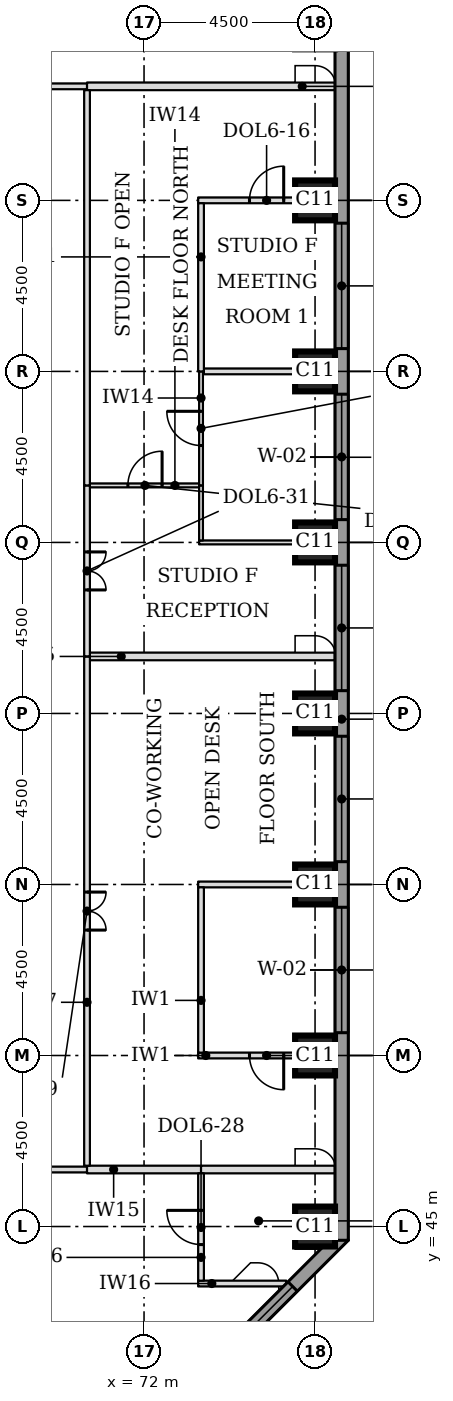
"""IFC4 building model, lengths in metres.
Left out: names, types, materials, properties, quantities, classifications, styles, units other than length and angle.
Written with IfcOpenShell. Run it as: python <this file> out.ifc"""

import sys

from ifc_helpers import new_model, si_unit, direction, frame, frame_2d, origin, origin_2d, place, context, subcontext, project, spatial, rectangle, extrude, element, fill, save


model = new_model("IFC4")
c1 = context("Model", 3, precision=1e-05, world=origin(), true_north=direction((0.0, 1.0)))
c2 = subcontext(c1, "Body", "Model", "MODEL_VIEW")
j1 = project(units=[si_unit("LENGTHUNIT", "METRE"), si_unit("PLANEANGLEUNIT", "RADIAN")], contexts=[c1])
p1 = place(None, origin())
s1 = spatial("IfcSite", under=j1, at=p1, CompositionType="ELEMENT")
p2 = place(p1, origin())
s2 = spatial("IfcBuilding", under=s1, at=p2, CompositionType="ELEMENT")
p3 = place(p2, frame((0.0, 0.0, 119.6)))
s3 = spatial("IfcBuildingStorey", under=s2, at=p3, CompositionType="ELEMENT", Elevation=119.6)
for number, where, z_axis, x_axis in (
    (1, (76.5, 45.0, 0.0), (0.0, 0.0, 1.0), (1.0, 0.0, 0.0)),
    (2, (76.5, 49.5, 0.0), (0.0, 0.0, 1.0), (1.0, 0.0, 0.0)),
    (3, (76.5, 54.0, 0.0), (0.0, 0.0, 1.0), (1.0, 0.0, 0.0)),
    (4, (76.5, 58.5, 0.0), (0.0, 0.0, 1.0), (1.0, 0.0, 0.0)),
    (5, (76.5, 63.0, 0.0), (0.0, 0.0, 1.0), (1.0, 0.0, 0.0)),
    (6, (76.5, 67.5, 0.0), (0.0, 0.0, 1.0), (1.0, 0.0, 0.0)),
    (7, (76.5, 72.0, 0.0), (0.0, 0.0, 1.0), (1.0, 0.0, 0.0)),
):
    element("IfcColumn", number, at=place(p3, frame(where, z_axis=z_axis, x_axis=x_axis)), inside=s3, PredefinedType="COLUMN", context=c2, shape_type="SweptSolid", body=[
        extrude(rectangle(XDim=1.05, YDim=1.05, at=origin_2d()), origin(), (0.0, 0.0, 1.0), 3.7),
    ])
p4 = place(p3, frame((72.239, 39.749, 0.0), z_axis=(0.0, 0.0, 1.0), x_axis=(0.707106781187, 0.707106781187, 0.0)))
e8 = element("IfcWall", 8, at=p4, inside=s3, PredefinedType="STANDARD", context=c2, shape_type="SweptSolid", body=[
    extrude(rectangle(XDim=7.089, YDim=0.35, at=frame_2d((3.544, 0.0))), origin(), (0.0, 0.0, 1.0), 3.525),
])
p5 = place(p4, frame((1.894, 0.0, 0.9)))
e9 = element("IfcOpeningElement", 9, at=p5, cuts=e8, PredefinedType="OPENING", context=c2, shape_type="SweptSolid", body=[
    extrude(rectangle(XDim=3.3, YDim=1.9, at=frame_2d((1.65, 0.95))), frame((0.0, 0.185, 0.0), z_axis=(0.0, -1.0, 0.0), x_axis=(1.0, 0.0, 0.0)), (0.0, 0.0, 1.0), 0.37),
])
p6 = place(p3, frame((77.2, 44.638, 0.0), z_axis=(0.0, 0.0, 1.0), x_axis=(0.0, 1.0, 0.0)))
e10 = element("IfcWall", 10, at=p6, inside=s3, PredefinedType="STANDARD", context=c2, shape_type="SweptSolid", body=[
    extrude(rectangle(XDim=32.225, YDim=0.35, at=frame_2d((16.112, 0.0))), origin(), (0.0, 0.0, 1.0), 3.525),
])
p7 = place(p6, frame((5.462, 0.0, 0.9)))
e11 = element("IfcOpeningElement", 11, at=p7, cuts=e10, PredefinedType="OPENING", context=c2, shape_type="SweptSolid", body=[
    extrude(rectangle(XDim=3.3, YDim=1.9, at=frame_2d((1.65, 0.95))), frame((0.0, 0.185, 0.0), z_axis=(0.0, -1.0, 0.0), x_axis=(1.0, 0.0, 0.0)), (0.0, 0.0, 1.0), 0.37),
])
p8 = place(p6, frame((9.962, 0.0, 0.9)))
e12 = element("IfcOpeningElement", 12, at=p8, cuts=e10, PredefinedType="OPENING", context=c2, shape_type="SweptSolid", body=[
    extrude(rectangle(XDim=3.3, YDim=1.9, at=frame_2d((1.65, 0.95))), frame((0.0, 0.185, 0.0), z_axis=(0.0, -1.0, 0.0), x_axis=(1.0, 0.0, 0.0)), (0.0, 0.0, 1.0), 0.37),
])
p9 = place(p6, frame((14.462, 0.0, 0.9)))
e13 = element("IfcOpeningElement", 13, at=p9, cuts=e10, PredefinedType="OPENING", context=c2, shape_type="SweptSolid", body=[
    extrude(rectangle(XDim=3.3, YDim=1.9, at=frame_2d((1.65, 0.95))), frame((0.0, 0.185, 0.0), z_axis=(0.0, -1.0, 0.0), x_axis=(1.0, 0.0, 0.0)), (0.0, 0.0, 1.0), 0.37),
])
p10 = place(p6, frame((18.962, 0.0, 0.9)))
e14 = element("IfcOpeningElement", 14, at=p10, cuts=e10, PredefinedType="OPENING", context=c2, shape_type="SweptSolid", body=[
    extrude(rectangle(XDim=3.3, YDim=1.9, at=frame_2d((1.65, 0.95))), frame((0.0, 0.185, 0.0), z_axis=(0.0, -1.0, 0.0), x_axis=(1.0, 0.0, 0.0)), (0.0, 0.0, 1.0), 0.37),
])
p11 = place(p6, frame((23.462, 0.0, 0.9)))
e15 = element("IfcOpeningElement", 15, at=p11, cuts=e10, PredefinedType="OPENING", context=c2, shape_type="SweptSolid", body=[
    extrude(rectangle(XDim=3.3, YDim=1.9, at=frame_2d((1.65, 0.95))), frame((0.0, 0.185, 0.0), z_axis=(0.0, -1.0, 0.0), x_axis=(1.0, 0.0, 0.0)), (0.0, 0.0, 1.0), 0.37),
])
p12 = place(p3, frame((73.425, 43.5, 0.0), z_axis=(0.0, 0.0, 1.0), x_axis=(1.0, 0.0, 0.0)))
e16 = element("IfcWall", 16, at=p12, inside=s3, PredefinedType="PARTITIONING", context=c2, shape_type="SweptSolid", body=[
    extrude(rectangle(XDim=2.317, YDim=0.15, at=frame_2d((1.159, 0.0))), origin(), (0.0, 0.0, 1.0), 3.55),
])
p13 = place(p3, frame((54.0, 46.5, 0.0), z_axis=(0.0, 0.0, 1.0), x_axis=(1.0, 0.0, 0.0)))
e17 = element("IfcWall", 17, at=p13, inside=s3, PredefinedType="PARTITIONING", context=c2, shape_type="SweptSolid", body=[
    extrude(rectangle(XDim=16.5, YDim=0.15, at=frame_2d((8.25, 0.0))), origin(), (0.0, 0.0, 1.0), 3.55),
])
p14 = place(p3, frame((70.5, 46.5, 0.0), z_axis=(0.0, 0.0, 1.0), x_axis=(1.0, 0.0, 0.0)))
e18 = element("IfcWall", 18, at=p14, inside=s3, PredefinedType="PARTITIONING", context=c2, shape_type="SweptSolid", body=[
    extrude(rectangle(XDim=3.0, YDim=0.2, at=frame_2d((1.5, 0.0))), origin(), (0.0, 0.0, 1.0), 3.55),
])
p15 = place(p3, frame((73.5, 46.5, 0.0), z_axis=(0.0, 0.0, 1.0), x_axis=(1.0, 0.0, 0.0)))
e19 = element("IfcWall", 19, at=p15, inside=s3, PredefinedType="PARTITIONING", context=c2, shape_type="SweptSolid", body=[
    extrude(rectangle(XDim=3.525, YDim=0.2, at=frame_2d((1.762, 0.0))), origin(), (0.0, 0.0, 1.0), 3.55),
])
p16 = place(p3, frame((73.425, 49.5, 0.0), z_axis=(0.0, 0.0, 1.0), x_axis=(1.0, 0.0, 0.0)))
e20 = element("IfcWall", 20, at=p16, inside=s3, PredefinedType="PARTITIONING", context=c2, shape_type="SweptSolid", body=[
    extrude(rectangle(XDim=3.6, YDim=0.15, at=frame_2d((1.8, 0.0))), origin(), (0.0, 0.0, 1.0), 3.55),
])
p17 = place(p16, frame((1.35, 0.0, 0.0)))
e21 = element("IfcOpeningElement", 21, at=p17, cuts=e20, PredefinedType="OPENING", context=c2, shape_type="SweptSolid", body=[
    extrude(rectangle(XDim=0.9, YDim=2.1, at=frame_2d((0.45, 1.05))), frame((0.0, 0.085, 0.0), z_axis=(0.0, -1.0, 0.0), x_axis=(1.0, 0.0, 0.0)), (0.0, 0.0, 1.0), 0.17),
])
p18 = place(p3, frame((73.425, 54.0, 0.0), z_axis=(0.0, 0.0, 1.0), x_axis=(1.0, 0.0, 0.0)))
e22 = element("IfcWall", 22, at=p18, inside=s3, PredefinedType="PARTITIONING", context=c2, shape_type="SweptSolid", body=[
    extrude(rectangle(XDim=3.6, YDim=0.15, at=frame_2d((1.8, 0.0))), origin(), (0.0, 0.0, 1.0), 3.55),
])
p19 = place(p3, frame((70.575, 60.0, 0.0), z_axis=(0.0, 0.0, 1.0), x_axis=(1.0, 0.0, 0.0)))
e23 = element("IfcWall", 23, at=p19, inside=s3, PredefinedType="PARTITIONING", context=c2, shape_type="SweptSolid", body=[
    extrude(rectangle(XDim=6.45, YDim=0.2, at=frame_2d((3.225, 0.0))), origin(), (0.0, 0.0, 1.0), 3.55),
])
p20 = place(p3, frame((73.45, 63.0, 0.0), z_axis=(0.0, 0.0, 1.0), x_axis=(1.0, 0.0, 0.0)))
e24 = element("IfcWall", 24, at=p20, inside=s3, PredefinedType="PARTITIONING", context=c2, shape_type="SweptSolid", body=[
    extrude(rectangle(XDim=3.575, YDim=0.1, at=frame_2d((1.788, 0.0))), origin(), (0.0, 0.0, 1.0), 3.55),
])
p21 = place(p3, frame((70.575, 64.5, 0.0), z_axis=(0.0, 0.0, 1.0), x_axis=(1.0, 0.0, 0.0)))
e25 = element("IfcWall", 25, at=p21, inside=s3, PredefinedType="PARTITIONING", context=c2, shape_type="SweptSolid", body=[
    extrude(rectangle(XDim=2.875, YDim=0.1, at=frame_2d((1.438, 0.0))), origin(), (0.0, 0.0, 1.0), 3.55),
])
p22 = place(p21, frame((1.0, 0.0, 0.0)))
e26 = element("IfcOpeningElement", 26, at=p22, cuts=e25, PredefinedType="OPENING", context=c2, shape_type="SweptSolid", body=[
    extrude(rectangle(XDim=0.9, YDim=2.1, at=frame_2d((0.45, 1.05))), frame((0.0, 0.06, 0.0), z_axis=(0.0, -1.0, 0.0), x_axis=(1.0, 0.0, 0.0)), (0.0, 0.0, 1.0), 0.12),
])
p23 = place(p3, frame((73.575, 67.5, 0.0), z_axis=(0.0, 0.0, 1.0), x_axis=(1.0, 0.0, 0.0)))
e27 = element("IfcWall", 27, at=p23, inside=s3, PredefinedType="PARTITIONING", context=c2, shape_type="SweptSolid", body=[
    extrude(rectangle(XDim=3.45, YDim=0.15, at=frame_2d((1.725, 0.0))), origin(), (0.0, 0.0, 1.0), 3.55),
])
p24 = place(p3, frame((73.425, 72.0, 0.0), z_axis=(0.0, 0.0, 1.0), x_axis=(1.0, 0.0, 0.0)))
e28 = element("IfcWall", 28, at=p24, inside=s3, PredefinedType="PARTITIONING", context=c2, shape_type="SweptSolid", body=[
    extrude(rectangle(XDim=3.6, YDim=0.15, at=frame_2d((1.8, 0.0))), origin(), (0.0, 0.0, 1.0), 3.55),
])
p25 = place(p24, frame((1.35, 0.0, 0.0)))
e29 = element("IfcOpeningElement", 29, at=p25, cuts=e28, PredefinedType="OPENING", context=c2, shape_type="SweptSolid", body=[
    extrude(rectangle(XDim=0.9, YDim=2.1, at=frame_2d((0.45, 1.05))), frame((0.0, 0.085, 0.0), z_axis=(0.0, -1.0, 0.0), x_axis=(1.0, 0.0, 0.0)), (0.0, 0.0, 1.0), 0.17),
])
p26 = place(p3, frame((58.5, 75.0, 0.0), z_axis=(0.0, 0.0, 1.0), x_axis=(1.0, 0.0, 0.0)))
e30 = element("IfcWall", 30, at=p26, inside=s3, PredefinedType="PARTITIONING", context=c2, shape_type="SweptSolid", body=[
    extrude(rectangle(XDim=12.0, YDim=0.15, at=frame_2d((6.0, 0.0))), origin(), (0.0, 0.0, 1.0), 3.55),
])
p27 = place(p3, frame((70.5, 75.0, 0.0), z_axis=(0.0, 0.0, 1.0), x_axis=(1.0, 0.0, 0.0)))
e31 = element("IfcWall", 31, at=p27, inside=s3, PredefinedType="PARTITIONING", context=c2, shape_type="SweptSolid", body=[
    extrude(rectangle(XDim=6.525, YDim=0.2, at=frame_2d((3.262, 0.0))), origin(), (0.0, 0.0, 1.0), 3.55),
])
p28 = place(p3, frame((73.5, 43.575, 0.0), z_axis=(0.0, 0.0, 1.0), x_axis=(0.0, 1.0, 0.0)))
e32 = element("IfcWall", 32, at=p28, inside=s3, PredefinedType="PARTITIONING", context=c2, shape_type="SweptSolid", body=[
    extrude(rectangle(XDim=2.825, YDim=0.15, at=frame_2d((1.413, 0.0))), origin(), (0.0, 0.0, 1.0), 3.55),
])
p29 = place(p28, frame((0.95, 0.0, 0.0)))
e33 = element("IfcOpeningElement", 33, at=p29, cuts=e32, PredefinedType="OPENING", context=c2, shape_type="SweptSolid", body=[
    extrude(rectangle(XDim=0.9, YDim=2.1, at=frame_2d((0.45, 1.05))), frame((0.0, 0.085, 0.0), z_axis=(0.0, -1.0, 0.0), x_axis=(1.0, 0.0, 0.0)), (0.0, 0.0, 1.0), 0.17),
])
p30 = place(p3, frame((70.5, 46.6, 0.0), z_axis=(0.0, 0.0, 1.0), x_axis=(0.0, 1.0, 0.0)))
e34 = element("IfcWall", 34, at=p30, inside=s3, PredefinedType="PARTITIONING", context=c2, shape_type="SweptSolid", body=[
    extrude(rectangle(XDim=13.4, YDim=0.15, at=frame_2d((6.7, 0.0))), origin(), (0.0, 0.0, 1.0), 3.55),
])
p31 = place(p30, frame((6.2, 0.0, 0.0)))
e35 = element("IfcOpeningElement", 35, at=p31, cuts=e34, PredefinedType="OPENING", context=c2, shape_type="SweptSolid", body=[
    extrude(rectangle(XDim=1.0, YDim=2.1, at=frame_2d((0.5, 1.05))), frame((0.0, 0.085, 0.0), z_axis=(0.0, -1.0, 0.0), x_axis=(1.0, 0.0, 0.0)), (0.0, 0.0, 1.0), 0.17),
])
p32 = place(p3, frame((73.5, 49.575, 0.0), z_axis=(0.0, 0.0, 1.0), x_axis=(0.0, 1.0, 0.0)))
e36 = element("IfcWall", 36, at=p32, inside=s3, PredefinedType="PARTITIONING", context=c2, shape_type="SweptSolid", body=[
    extrude(rectangle(XDim=4.35, YDim=0.15, at=frame_2d((2.175, 0.0))), origin(), (0.0, 0.0, 1.0), 3.55),
])
p33 = place(p3, frame((70.5, 60.0, 0.0), z_axis=(0.0, 0.0, 1.0), x_axis=(0.0, 1.0, 0.0)))
e37 = element("IfcWall", 37, at=p33, inside=s3, PredefinedType="PARTITIONING", context=c2, shape_type="SweptSolid", body=[
    extrude(rectangle(XDim=4.5, YDim=0.15, at=frame_2d((2.25, 0.0))), origin(), (0.0, 0.0, 1.0), 3.55),
])
p34 = place(p33, frame((1.75, 0.0, 0.0)))
e38 = element("IfcOpeningElement", 38, at=p34, cuts=e37, PredefinedType="OPENING", context=c2, shape_type="SweptSolid", body=[
    extrude(rectangle(XDim=1.0, YDim=2.1, at=frame_2d((0.5, 1.05))), frame((0.0, 0.085, 0.0), z_axis=(0.0, -1.0, 0.0), x_axis=(1.0, 0.0, 0.0)), (0.0, 0.0, 1.0), 0.17),
])
p35 = place(p3, frame((73.5, 63.05, 0.0), z_axis=(0.0, 0.0, 1.0), x_axis=(0.0, 1.0, 0.0)))
e39 = element("IfcWall", 39, at=p35, inside=s3, PredefinedType="PARTITIONING", context=c2, shape_type="SweptSolid", body=[
    extrude(rectangle(XDim=1.45, YDim=0.1, at=frame_2d((0.725, 0.0))), origin(), (0.0, 0.0, 1.0), 3.55),
])
p36 = place(p3, frame((70.5, 64.5, 0.0), z_axis=(0.0, 0.0, 1.0), x_axis=(0.0, 1.0, 0.0)))
e40 = element("IfcWall", 40, at=p36, inside=s3, PredefinedType="PARTITIONING", context=c2, shape_type="SweptSolid", body=[
    extrude(rectangle(XDim=10.4, YDim=0.15, at=frame_2d((5.2, 0.0))), origin(), (0.0, 0.0, 1.0), 3.55),
])
p37 = place(p3, frame((73.5, 64.5, 0.0), z_axis=(0.0, 0.0, 1.0), x_axis=(0.0, 1.0, 0.0)))
e41 = element("IfcWall", 41, at=p37, inside=s3, PredefinedType="PARTITIONING", context=c2, shape_type="SweptSolid", body=[
    extrude(rectangle(XDim=3.0, YDim=0.1, at=frame_2d((1.5, 0.0))), origin(), (0.0, 0.0, 1.0), 3.55),
])
p38 = place(p37, frame((1.05, 0.0, 0.0)))
e42 = element("IfcOpeningElement", 42, at=p38, cuts=e41, PredefinedType="OPENING", context=c2, shape_type="SweptSolid", body=[
    extrude(rectangle(XDim=0.9, YDim=2.1, at=frame_2d((0.45, 1.05))), frame((0.0, 0.06, 0.0), z_axis=(0.0, -1.0, 0.0), x_axis=(1.0, 0.0, 0.0)), (0.0, 0.0, 1.0), 0.12),
])
p39 = place(p3, frame((73.5, 67.5, 0.0), z_axis=(0.0, 0.0, 1.0), x_axis=(0.0, 1.0, 0.0)))
e43 = element("IfcWall", 43, at=p39, inside=s3, PredefinedType="PARTITIONING", context=c2, shape_type="SweptSolid", body=[
    extrude(rectangle(XDim=4.425, YDim=0.15, at=frame_2d((2.212, 0.0))), origin(), (0.0, 0.0, 1.0), 3.55),
])
p40 = place(p5, origin())
e44 = element("IfcWindow", 44, at=p40, inside=s3, PartitioningType="SINGLE_PANEL", PredefinedType="WINDOW", context=c2, shape_type="SweptSolid", body=[
    extrude(rectangle(XDim=3.3, YDim=1.9, at=frame_2d((1.65, 0.95))), frame((0.0, 0.085, 0.0), z_axis=(0.0, -1.0, 0.0), x_axis=(1.0, 0.0, 0.0)), (0.0, 0.0, 1.0), 0.06),
])
fill(e9, e44)
p41 = place(p7, origin())
e45 = element("IfcWindow", 45, at=p41, inside=s3, PartitioningType="SINGLE_PANEL", PredefinedType="WINDOW", context=c2, shape_type="SweptSolid", body=[
    extrude(rectangle(XDim=3.3, YDim=1.9, at=frame_2d((1.65, 0.95))), frame((0.0, 0.085, 0.0), z_axis=(0.0, -1.0, 0.0), x_axis=(1.0, 0.0, 0.0)), (0.0, 0.0, 1.0), 0.06),
])
fill(e11, e45)
p42 = place(p8, origin())
e46 = element("IfcWindow", 46, at=p42, inside=s3, PartitioningType="SINGLE_PANEL", PredefinedType="WINDOW", context=c2, shape_type="SweptSolid", body=[
    extrude(rectangle(XDim=3.3, YDim=1.9, at=frame_2d((1.65, 0.95))), frame((0.0, 0.085, 0.0), z_axis=(0.0, -1.0, 0.0), x_axis=(1.0, 0.0, 0.0)), (0.0, 0.0, 1.0), 0.06),
])
fill(e12, e46)
p43 = place(p9, origin())
e47 = element("IfcWindow", 47, at=p43, inside=s3, PartitioningType="SINGLE_PANEL", PredefinedType="WINDOW", context=c2, shape_type="SweptSolid", body=[
    extrude(rectangle(XDim=3.3, YDim=1.9, at=frame_2d((1.65, 0.95))), frame((0.0, 0.085, 0.0), z_axis=(0.0, -1.0, 0.0), x_axis=(1.0, 0.0, 0.0)), (0.0, 0.0, 1.0), 0.06),
])
fill(e13, e47)
p44 = place(p10, origin())
e48 = element("IfcWindow", 48, at=p44, inside=s3, PartitioningType="SINGLE_PANEL", PredefinedType="WINDOW", context=c2, shape_type="SweptSolid", body=[
    extrude(rectangle(XDim=3.3, YDim=1.9, at=frame_2d((1.65, 0.95))), frame((0.0, 0.085, 0.0), z_axis=(0.0, -1.0, 0.0), x_axis=(1.0, 0.0, 0.0)), (0.0, 0.0, 1.0), 0.06),
])
fill(e14, e48)
p45 = place(p11, origin())
e49 = element("IfcWindow", 49, at=p45, inside=s3, PartitioningType="SINGLE_PANEL", PredefinedType="WINDOW", context=c2, shape_type="SweptSolid", body=[
    extrude(rectangle(XDim=3.3, YDim=1.9, at=frame_2d((1.65, 0.95))), frame((0.0, 0.085, 0.0), z_axis=(0.0, -1.0, 0.0), x_axis=(1.0, 0.0, 0.0)), (0.0, 0.0, 1.0), 0.06),
])
fill(e15, e49)
p46 = place(p29, origin())
e50 = element("IfcDoor", 50, at=p46, inside=s3, OperationType="SINGLE_SWING_RIGHT", PredefinedType="DOOR", context=c2, shape_type="SweptSolid", body=[
    extrude(rectangle(XDim=0.9, YDim=2.1, at=frame_2d((0.45, 1.05))), frame((0.0, 0.025, 0.0), z_axis=(0.0, -1.0, 0.0), x_axis=(1.0, 0.0, 0.0)), (0.0, 0.0, 1.0), 0.05),
])
fill(e33, e50)
p47 = place(p31, frame((1.0, 0.0, 0.0), z_axis=(0.0, 0.0, 1.0), x_axis=(-1.0, 0.0, 0.0)))
e51 = element("IfcDoor", 51, at=p47, inside=s3, OperationType="DOUBLE_DOOR_SINGLE_SWING", PredefinedType="DOOR", context=c2, shape_type="SweptSolid", body=[
    extrude(rectangle(XDim=1.0, YDim=2.1, at=frame_2d((0.5, 1.05))), frame((0.0, 0.025, 0.0), z_axis=(0.0, -1.0, 0.0), x_axis=(1.0, 0.0, 0.0)), (0.0, 0.0, 1.0), 0.05),
])
fill(e35, e51)
p48 = place(p17, frame((0.9, 0.0, 0.0), z_axis=(0.0, 0.0, 1.0), x_axis=(-1.0, 0.0, 0.0)))
e52 = element("IfcDoor", 52, at=p48, inside=s3, OperationType="SINGLE_SWING_LEFT", PredefinedType="DOOR", context=c2, shape_type="SweptSolid", body=[
    extrude(rectangle(XDim=0.9, YDim=2.1, at=frame_2d((0.45, 1.05))), frame((0.0, 0.025, 0.0), z_axis=(0.0, -1.0, 0.0), x_axis=(1.0, 0.0, 0.0)), (0.0, 0.0, 1.0), 0.05),
])
fill(e21, e52)
p49 = place(p34, frame((1.0, 0.0, 0.0), z_axis=(0.0, 0.0, 1.0), x_axis=(-1.0, 0.0, 0.0)))
e53 = element("IfcDoor", 53, at=p49, inside=s3, OperationType="DOUBLE_DOOR_SINGLE_SWING", PredefinedType="DOOR", context=c2, shape_type="SweptSolid", body=[
    extrude(rectangle(XDim=1.0, YDim=2.1, at=frame_2d((0.5, 1.05))), frame((0.0, 0.025, 0.0), z_axis=(0.0, -1.0, 0.0), x_axis=(1.0, 0.0, 0.0)), (0.0, 0.0, 1.0), 0.05),
])
fill(e38, e53)
p50 = place(p22, origin())
e54 = element("IfcDoor", 54, at=p50, inside=s3, OperationType="SINGLE_SWING_RIGHT", PredefinedType="DOOR", context=c2, shape_type="SweptSolid", body=[
    extrude(rectangle(XDim=0.9, YDim=2.1, at=frame_2d((0.45, 1.05))), frame((0.0, 0.025, 0.0), z_axis=(0.0, -1.0, 0.0), x_axis=(1.0, 0.0, 0.0)), (0.0, 0.0, 1.0), 0.05),
])
fill(e26, e54)
p51 = place(p38, origin())
e55 = element("IfcDoor", 55, at=p51, inside=s3, OperationType="SINGLE_SWING_RIGHT", PredefinedType="DOOR", context=c2, shape_type="SweptSolid", body=[
    extrude(rectangle(XDim=0.9, YDim=2.1, at=frame_2d((0.45, 1.05))), frame((0.0, 0.025, 0.0), z_axis=(0.0, -1.0, 0.0), x_axis=(1.0, 0.0, 0.0)), (0.0, 0.0, 1.0), 0.05),
])
fill(e42, e55)
p52 = place(p25, origin())
e56 = element("IfcDoor", 56, at=p52, inside=s3, OperationType="SINGLE_SWING_RIGHT", PredefinedType="DOOR", context=c2, shape_type="SweptSolid", body=[
    extrude(rectangle(XDim=0.9, YDim=2.1, at=frame_2d((0.45, 1.05))), frame((0.0, 0.025, 0.0), z_axis=(0.0, -1.0, 0.0), x_axis=(1.0, 0.0, 0.0)), (0.0, 0.0, 1.0), 0.05),
])
fill(e29, e56)
save(model, sys.argv[1])
